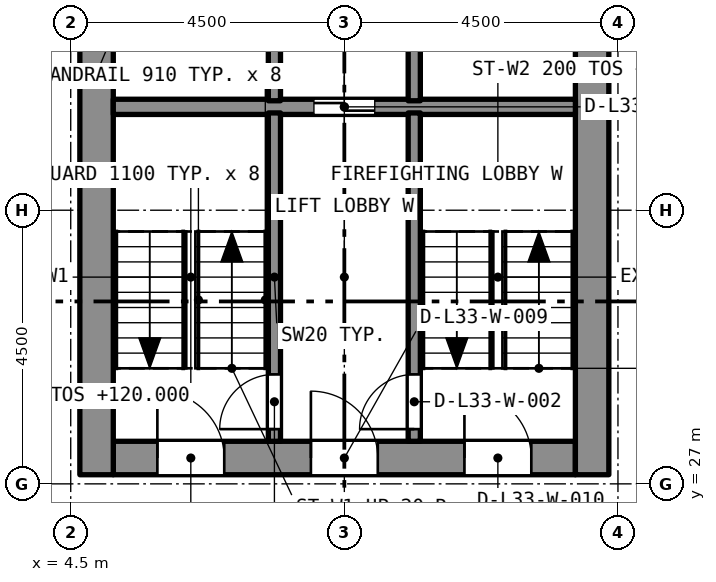
"""IFC4 building model, lengths in metres.
Left out: names, types, materials, properties, quantities, classifications, styles, units other than length and angle.
Written with IfcOpenShell. Run it as: python <this file> out.ifc"""

import sys

from ifc_helpers import new_model, si_unit, direction, frame, frame_2d, origin, place, context, subcontext, project, spatial, rectangle, extrude, element, fill, save


model = new_model("IFC4")
c1 = context("Model", 3, precision=1e-05, world=origin(), true_north=direction((0.0, 1.0)))
c2 = subcontext(c1, "Body", "Model", "MODEL_VIEW")
j1 = project(units=[si_unit("LENGTHUNIT", "METRE"), si_unit("PLANEANGLEUNIT", "RADIAN")], contexts=[c1])
p1 = place(None, origin())
s1 = spatial("IfcSite", under=j1, at=p1, CompositionType="ELEMENT")
p2 = place(p1, origin())
s2 = spatial("IfcBuilding", under=s1, at=p2, CompositionType="ELEMENT")
p3 = place(p2, frame((0.0, 0.0, 118.4)))
s3 = spatial("IfcBuildingStorey", under=s2, at=p3, CompositionType="ELEMENT", Elevation=118.4)
p4 = place(p3, frame((5.2, 27.425, 0.0), z_axis=(0.0, 0.0, 1.0), x_axis=(1.0, 0.0, 0.0)))
e1 = element("IfcWall", 1, at=p4, inside=s3, PredefinedType="SOLIDWALL", context=c2, shape_type="SweptSolid", body=[
    extrude(rectangle(XDim=7.6, YDim=0.55, at=frame_2d((3.8, 0.0))), origin(), (0.0, 0.0, 1.0), 3.2),
])
p5 = place(p4, frame((0.725, 0.0, 0.0)))
e2 = element("IfcOpeningElement", 2, at=p5, cuts=e1, PredefinedType="OPENING", context=c2, shape_type="SweptSolid", body=[
    extrude(rectangle(XDim=1.1, YDim=2.1, at=frame_2d((0.55, 1.05))), frame((0.0, 0.285, 0.0), z_axis=(0.0, -1.0, 0.0), x_axis=(1.0, 0.0, 0.0)), (0.0, 0.0, 1.0), 0.57),
])
p6 = place(p4, frame((3.25, 0.0, 0.0)))
e3 = element("IfcOpeningElement", 3, at=p6, cuts=e1, PredefinedType="OPENING", context=c2, shape_type="SweptSolid", body=[
    extrude(rectangle(XDim=1.1, YDim=2.1, at=frame_2d((0.55, 1.05))), frame((0.0, 0.285, 0.0), z_axis=(0.0, -1.0, 0.0), x_axis=(1.0, 0.0, 0.0)), (0.0, 0.0, 1.0), 0.57),
])
p7 = place(p4, frame((5.775, 0.0, 0.0)))
e4 = element("IfcOpeningElement", 4, at=p7, cuts=e1, PredefinedType="OPENING", context=c2, shape_type="SweptSolid", body=[
    extrude(rectangle(XDim=1.1, YDim=2.1, at=frame_2d((0.55, 1.05))), frame((0.0, 0.285, 0.0), z_axis=(0.0, -1.0, 0.0), x_axis=(1.0, 0.0, 0.0)), (0.0, 0.0, 1.0), 0.57),
])
p8 = place(p3, frame((4.925, 27.15, 0.0), z_axis=(0.0, 0.0, 1.0), x_axis=(0.0, 1.0, 0.0)))
e5 = element("IfcWall", 5, at=p8, inside=s3, PredefinedType="SOLIDWALL", context=c2, shape_type="SweptSolid", body=[
    extrude(rectangle(XDim=13.2, YDim=0.55, at=frame_2d((6.6, 0.0))), origin(), (0.0, 0.0, 1.0), 3.2),
])
p9 = place(p8, frame((8.8, 0.0, 0.0)))
e6 = element("IfcOpeningElement", 6, at=p9, cuts=e5, PredefinedType="OPENING", context=c2, shape_type="SweptSolid", body=[
    extrude(rectangle(XDim=1.2, YDim=2.1, at=frame_2d((0.6, 1.05))), frame((0.0, 0.285, 0.0), z_axis=(0.0, -1.0, 0.0), x_axis=(1.0, 0.0, 0.0)), (0.0, 0.0, 1.0), 0.57),
])
p10 = place(p3, frame((13.075, 27.15, 0.0), z_axis=(0.0, 0.0, 1.0), x_axis=(0.0, 1.0, 0.0)))
e7 = element("IfcWall", 7, at=p10, inside=s3, PredefinedType="SOLIDWALL", context=c2, shape_type="SweptSolid", body=[
    extrude(rectangle(XDim=13.2, YDim=0.55, at=frame_2d((6.6, 0.0))), origin(), (0.0, 0.0, 1.0), 3.2),
])
p11 = place(p10, frame((10.95, 0.0, 0.0)))
e8 = element("IfcOpeningElement", 8, at=p11, cuts=e7, PredefinedType="OPENING", context=c2, shape_type="SweptSolid", body=[
    extrude(rectangle(XDim=1.1, YDim=2.1, at=frame_2d((0.55, 1.05))), frame((0.0, 0.285, 0.0), z_axis=(0.0, -1.0, 0.0), x_axis=(1.0, 0.0, 0.0)), (0.0, 0.0, 1.0), 0.57),
])
p12 = place(p10, frame((8.8, 0.0, 0.0)))
e9 = element("IfcOpeningElement", 9, at=p12, cuts=e7, PredefinedType="OPENING", context=c2, shape_type="SweptSolid", body=[
    extrude(rectangle(XDim=1.2, YDim=2.1, at=frame_2d((0.6, 1.05))), frame((0.0, 0.285, 0.0), z_axis=(0.0, -1.0, 0.0), x_axis=(1.0, 0.0, 0.0)), (0.0, 0.0, 1.0), 0.57),
])
p13 = place(p3, frame((5.2, 33.2, 0.0), z_axis=(0.0, 0.0, 1.0), x_axis=(1.0, 0.0, 0.0)))
e10 = element("IfcWall", 10, at=p13, inside=s3, PredefinedType="SOLIDWALL", context=c2, shape_type="SweptSolid", body=[
    extrude(rectangle(XDim=7.6, YDim=0.25, at=frame_2d((3.8, 0.0))), origin(), (0.0, 0.0, 1.0), 2.9),
])
p14 = place(p13, frame((3.3, 0.0, 0.0)))
e11 = element("IfcOpeningElement", 11, at=p14, cuts=e10, PredefinedType="OPENING", context=c2, shape_type="SweptSolid", body=[
    extrude(rectangle(XDim=1.0, YDim=2.1, at=frame_2d((0.5, 1.05))), frame((0.0, 0.135, 0.0), z_axis=(0.0, -1.0, 0.0), x_axis=(1.0, 0.0, 0.0)), (0.0, 0.0, 1.0), 0.27),
])
p15 = place(p3, frame((7.85, 27.7, 0.0), z_axis=(0.0, 0.0, 1.0), x_axis=(0.0, 1.0, 0.0)))
e12 = element("IfcWall", 12, at=p15, inside=s3, PredefinedType="SOLIDWALL", context=c2, shape_type="SweptSolid", body=[
    extrude(rectangle(XDim=5.4, YDim=0.2, at=frame_2d((2.7, 0.0))), origin(), (0.0, 0.0, 1.0), 2.9),
])
p16 = place(p15, frame((0.2, 0.0, 0.0)))
e13 = element("IfcOpeningElement", 13, at=p16, cuts=e12, PredefinedType="OPENING", context=c2, shape_type="SweptSolid", body=[
    extrude(rectangle(XDim=0.9, YDim=2.1, at=frame_2d((0.45, 1.05))), frame((0.0, 0.11, 0.0), z_axis=(0.0, -1.0, 0.0), x_axis=(1.0, 0.0, 0.0)), (0.0, 0.0, 1.0), 0.22),
])
p17 = place(p3, frame((10.15, 27.7, 0.0), z_axis=(0.0, 0.0, 1.0), x_axis=(0.0, 1.0, 0.0)))
e14 = element("IfcWall", 14, at=p17, inside=s3, PredefinedType="SOLIDWALL", context=c2, shape_type="SweptSolid", body=[
    extrude(rectangle(XDim=5.4, YDim=0.2, at=frame_2d((2.7, 0.0))), origin(), (0.0, 0.0, 1.0), 2.9),
])
p18 = place(p17, frame((0.2, 0.0, 0.0)))
e15 = element("IfcOpeningElement", 15, at=p18, cuts=e14, PredefinedType="OPENING", context=c2, shape_type="SweptSolid", body=[
    extrude(rectangle(XDim=0.9, YDim=2.1, at=frame_2d((0.45, 1.05))), frame((0.0, 0.11, 0.0), z_axis=(0.0, -1.0, 0.0), x_axis=(1.0, 0.0, 0.0)), (0.0, 0.0, 1.0), 0.22),
])
for number, where, z_axis, x_axis in (
    (16, (7.85, 33.3, 0.0), (0.0, 0.0, 1.0), (0.0, 1.0, 0.0)),
    (17, (10.15, 33.3, 0.0), (0.0, 0.0, 1.0), (0.0, 1.0, 0.0)),
):
    element("IfcWall", number, at=place(p3, frame(where, z_axis=z_axis, x_axis=x_axis)), inside=s3, PredefinedType="SOLIDWALL", context=c2, shape_type="SweptSolid", body=[
        extrude(rectangle(XDim=2.3, YDim=0.2, at=frame_2d((1.15, 0.0))), origin(), (0.0, 0.0, 1.0), 2.9),
    ])
p19 = place(p16, origin())
e18 = element("IfcDoor", 18, at=p19, inside=s3, OperationType="SINGLE_SWING_LEFT", PredefinedType="DOOR", context=c2, shape_type="SweptSolid", body=[
    extrude(rectangle(XDim=0.9, YDim=2.1, at=frame_2d((0.45, 1.05))), frame((0.0, 0.025, 0.0), z_axis=(0.0, -1.0, 0.0), x_axis=(1.0, 0.0, 0.0)), (0.0, 0.0, 1.0), 0.05),
])
fill(e13, e18)
p20 = place(p18, origin())
e19 = element("IfcDoor", 19, at=p20, inside=s3, OperationType="SINGLE_SWING_LEFT", PredefinedType="DOOR", context=c2, shape_type="SweptSolid", body=[
    extrude(rectangle(XDim=0.9, YDim=2.1, at=frame_2d((0.45, 1.05))), frame((0.0, 0.025, 0.0), z_axis=(0.0, -1.0, 0.0), x_axis=(1.0, 0.0, 0.0)), (0.0, 0.0, 1.0), 0.05),
])
fill(e15, e19)
p21 = place(p14, origin())
e20 = element("IfcDoor", 20, at=p21, inside=s3, OperationType="SLIDING_TO_LEFT", PredefinedType="DOOR", context=c2, shape_type="SweptSolid", body=[
    extrude(rectangle(XDim=1.0, YDim=2.1, at=frame_2d((0.5, 1.05))), frame((0.0, 0.025, 0.0), z_axis=(0.0, -1.0, 0.0), x_axis=(1.0, 0.0, 0.0)), (0.0, 0.0, 1.0), 0.05),
])
fill(e11, e20)
p22 = place(p5, origin())
e21 = element("IfcDoor", 21, at=p22, inside=s3, OperationType="SINGLE_SWING_LEFT", PredefinedType="DOOR", context=c2, shape_type="SweptSolid", body=[
    extrude(rectangle(XDim=1.1, YDim=2.1, at=frame_2d((0.55, 1.05))), frame((0.0, 0.025, 0.0), z_axis=(0.0, -1.0, 0.0), x_axis=(1.0, 0.0, 0.0)), (0.0, 0.0, 1.0), 0.05),
])
fill(e2, e21)
p23 = place(p6, origin())
e22 = element("IfcDoor", 22, at=p23, inside=s3, OperationType="SINGLE_SWING_LEFT", PredefinedType="DOOR", context=c2, shape_type="SweptSolid", body=[
    extrude(rectangle(XDim=1.1, YDim=2.1, at=frame_2d((0.55, 1.05))), frame((0.0, 0.025, 0.0), z_axis=(0.0, -1.0, 0.0), x_axis=(1.0, 0.0, 0.0)), (0.0, 0.0, 1.0), 0.05),
])
fill(e3, e22)
p24 = place(p7, origin())
e23 = element("IfcDoor", 23, at=p24, inside=s3, OperationType="SINGLE_SWING_LEFT", PredefinedType="DOOR", context=c2, shape_type="SweptSolid", body=[
    extrude(rectangle(XDim=1.1, YDim=2.1, at=frame_2d((0.55, 1.05))), frame((0.0, 0.025, 0.0), z_axis=(0.0, -1.0, 0.0), x_axis=(1.0, 0.0, 0.0)), (0.0, 0.0, 1.0), 0.05),
])
fill(e4, e23)
save(model, sys.argv[1])
